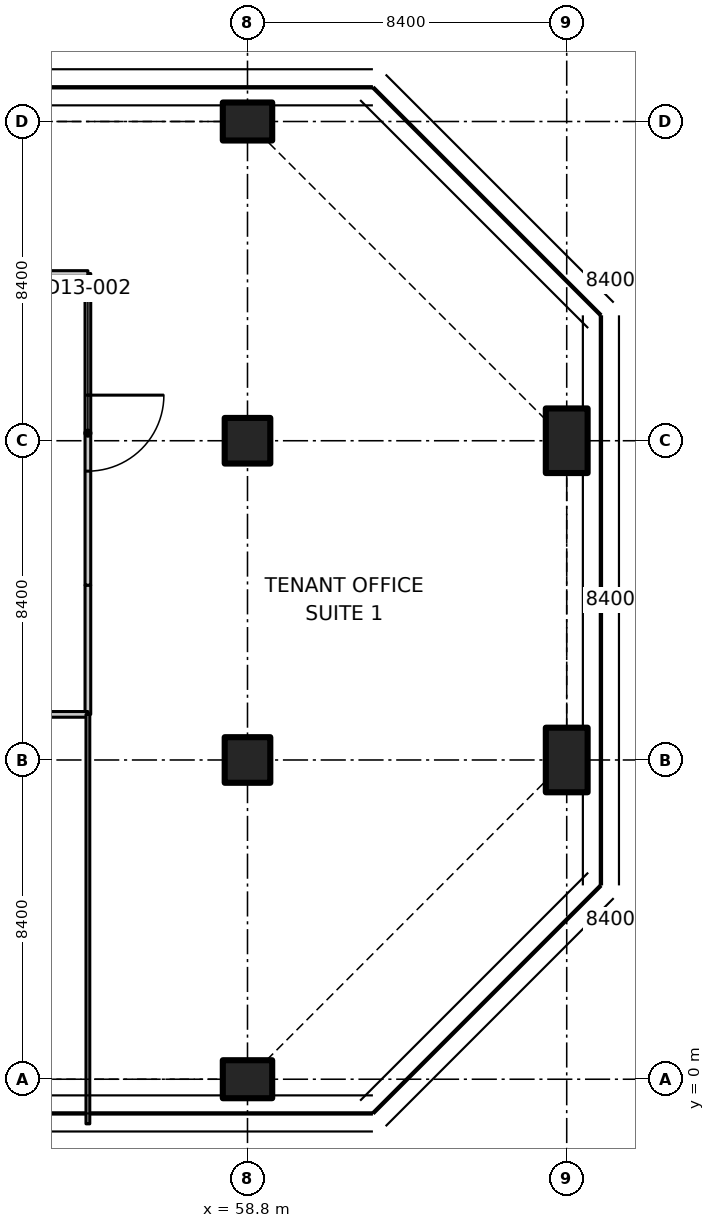
"""IFC4 building model, lengths in metres.
Left out: names, types, materials, properties, quantities, classifications, styles, units other than length and angle.
Written with IfcOpenShell. Run it as: python <this file> out.ifc"""

import sys

from ifc_helpers import new_model, si_unit, direction, frame, frame_2d, origin, origin_2d, place, context, subcontext, project, spatial, polyline, rectangle, outline, extrude, element, fill, save


model = new_model("IFC4")
c1 = context("Model", 3, precision=1e-05, world=origin(), true_north=direction((0.0, 1.0)))
c2 = subcontext(c1, "Body", "Model", "MODEL_VIEW")
j1 = project(units=[si_unit("LENGTHUNIT", "METRE"), si_unit("PLANEANGLEUNIT", "RADIAN")], contexts=[c1])
p1 = place(None, origin())
s1 = spatial("IfcSite", under=j1, at=p1, CompositionType="ELEMENT")
p2 = place(p1, origin())
s2 = spatial("IfcBuilding", under=s1, at=p2, CompositionType="ELEMENT")
p3 = place(p2, frame((0.0, 0.0, 91.7)))
s3 = spatial("IfcBuildingStorey", under=s2, at=p3, CompositionType="ELEMENT", Elevation=91.7)
p4 = place(p3, frame((58.8, 0.0, 0.0), z_axis=(0.0, 0.0, 1.0), x_axis=(0.0, 1.0, 0.0)))
e1 = element("IfcColumn", 1, at=p4, inside=s3, PredefinedType="COLUMN", context=c2, shape_type="SweptSolid", body=[
    extrude(rectangle(XDim=1.0, YDim=1.3, at=origin_2d()), origin(), (0.0, 0.0, 1.0), 3.35),
])
for number, where, z_axis, x_axis in (
    (2, (58.8, 8.4, 0.0), (0.0, 0.0, 1.0), (1.0, 0.0, 0.0)),
    (3, (58.8, 16.8, 0.0), (0.0, 0.0, 1.0), (1.0, 0.0, 0.0)),
):
    element("IfcColumn", number, at=place(p3, frame(where, z_axis=z_axis, x_axis=x_axis)), inside=s3, PredefinedType="COLUMN", context=c2, shape_type="SweptSolid", body=[
        extrude(rectangle(XDim=1.2, YDim=1.2, at=origin_2d()), origin(), (0.0, 0.0, 1.0), 3.35),
    ])
p5 = place(p3, frame((58.8, 25.2, 0.0), z_axis=(0.0, 0.0, 1.0), x_axis=(0.0, 1.0, 0.0)))
e4 = element("IfcColumn", 4, at=p5, inside=s3, PredefinedType="COLUMN", context=c2, shape_type="SweptSolid", body=[
    extrude(rectangle(XDim=1.0, YDim=1.3, at=origin_2d()), origin(), (0.0, 0.0, 1.0), 3.35),
])
for number, where, z_axis, x_axis in (
    (5, (67.2, 8.4, 0.0), (0.0, 0.0, 1.0), (1.0, 0.0, 0.0)),
    (6, (67.2, 16.8, 0.0), (0.0, 0.0, 1.0), (1.0, 0.0, 0.0)),
):
    element("IfcColumn", number, at=place(p3, frame(where, z_axis=z_axis, x_axis=x_axis)), inside=s3, PredefinedType="COLUMN", context=c2, shape_type="SweptSolid", body=[
        extrude(rectangle(XDim=1.1, YDim=1.7, at=origin_2d()), origin(), (0.0, 0.0, 1.0), 3.35),
    ])
p6 = place(p3, frame((54.6, 13.0, 0.0), z_axis=(0.0, 0.0, 1.0), x_axis=(0.0, -1.0, 0.0)))
e7 = element("IfcWall", 7, at=p6, inside=s3, PredefinedType="PARTITIONING", context=c2, shape_type="SweptSolid", body=[
    extrude(rectangle(XDim=3.4, YDim=0.15, at=frame_2d((1.7, 0.0))), origin(), (0.0, 0.0, 1.0), 3.33),
])
p7 = place(p3, frame((54.6, 9.6, 0.0), z_axis=(0.0, 0.0, 1.0), x_axis=(-1.0, 0.0, 0.0)))
e8 = element("IfcWall", 8, at=p7, inside=s3, PredefinedType="PARTITIONING", context=c2, shape_type="SweptSolid", body=[
    extrude(rectangle(XDim=16.8, YDim=0.15, at=frame_2d((8.4, 0.0))), origin(), (0.0, 0.0, 1.0), 3.33),
])
p8 = place(p7, frame((7.5, 0.0, 0.0)))
e9 = element("IfcOpeningElement", 9, at=p8, cuts=e8, PredefinedType="OPENING", context=c2, shape_type="SweptSolid", body=[
    extrude(rectangle(XDim=2.0, YDim=2.4, at=frame_2d((1.0, 1.2))), frame((0.0, 0.085, 0.0), z_axis=(0.0, -1.0, 0.0), x_axis=(1.0, 0.0, 0.0)), (0.0, 0.0, 1.0), 0.17),
])
p9 = place(p3, frame((54.6, 21.2, 0.0), z_axis=(0.0, 0.0, 1.0), x_axis=(0.0, -1.0, 0.0)))
e10 = element("IfcWall", 10, at=p9, inside=s3, PredefinedType="PARTITIONING", context=c2, shape_type="SweptSolid", body=[
    extrude(rectangle(XDim=8.2, YDim=0.15, at=frame_2d((4.1, 0.0))), origin(), (0.0, 0.0, 1.0), 3.33),
])
p10 = place(p9, frame((3.2, 0.0, 0.0)))
e11 = element("IfcOpeningElement", 11, at=p10, cuts=e10, PredefinedType="OPENING", context=c2, shape_type="SweptSolid", body=[
    extrude(rectangle(XDim=2.0, YDim=2.4, at=frame_2d((1.0, 1.2))), frame((0.0, 0.085, 0.0), z_axis=(0.0, -1.0, 0.0), x_axis=(1.0, 0.0, 0.0)), (0.0, 0.0, 1.0), 0.17),
])
p11 = place(p3, frame((54.6, -1.174, 0.0), z_axis=(0.0, 0.0, 1.0), x_axis=(0.0, 1.0, 0.0)))
e12 = element("IfcWall", 12, at=p11, inside=s3, PredefinedType="PARTITIONING", context=c2, shape_type="SweptSolid", body=[
    extrude(outline(polyline([(0.0, 0.0), (10.774, 0.0), (10.774, 3.33), (1.624, 3.33), (1.622, 2.98), (0.726, 2.98), (0.724, 3.33), (0.074, 3.33), (0.0, 3.33), (0.0, 0.0)])), frame((0.0, 0.05, 0.0), z_axis=(0.0, -1.0, 0.0), x_axis=(1.0, 0.0, 0.0)), (0.0, 0.0, 1.0), 0.1),
])
p12 = place(p3, frame((51.0, 21.2, 0.0), z_axis=(0.0, 0.0, 1.0), x_axis=(1.0, 0.0, 0.0)))
e13 = element("IfcWall", 13, at=p12, inside=s3, PredefinedType="PARTITIONING", context=c2, shape_type="SweptSolid", body=[
    extrude(rectangle(XDim=3.6, YDim=0.15, at=frame_2d((1.8, 0.0))), origin(), (0.0, 0.0, 1.0), 3.33),
])
p13 = place(p10, origin())
e14 = element("IfcDoor", 14, at=p13, inside=s3, OperationType="DOUBLE_DOOR_SINGLE_SWING", PredefinedType="DOOR", context=c2, shape_type="SweptSolid", body=[
    extrude(rectangle(XDim=2.0, YDim=2.4, at=frame_2d((1.0, 1.2))), frame((0.0, 0.025, 0.0), z_axis=(0.0, -1.0, 0.0), x_axis=(1.0, 0.0, 0.0)), (0.0, 0.0, 1.0), 0.05),
])
fill(e11, e14)
save(model, sys.argv[1])
